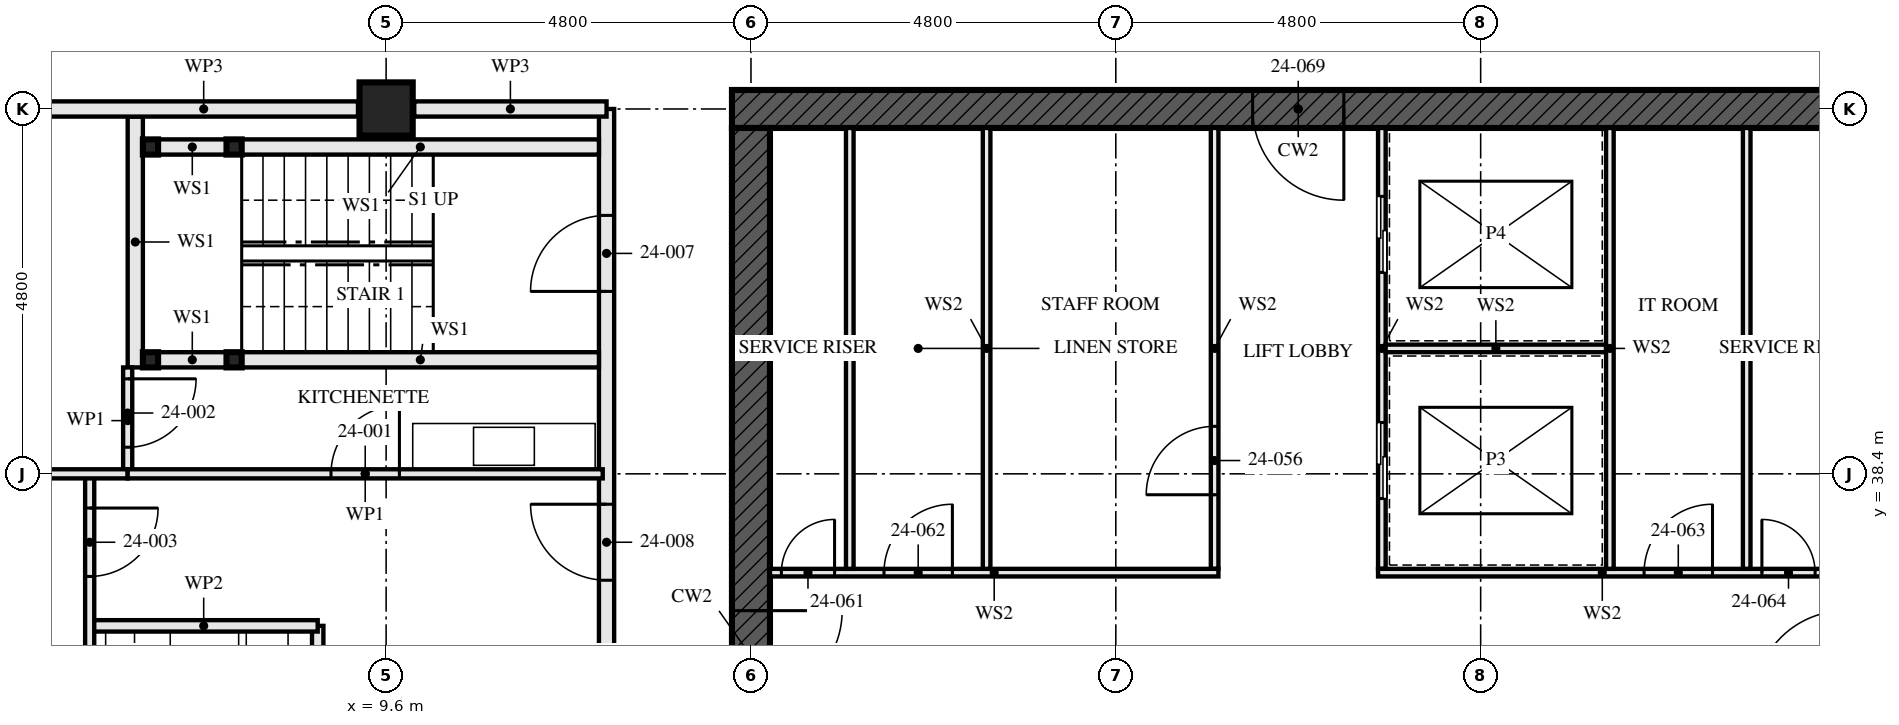
"""IFC4 building model, lengths in metres.
Left out: names, types, materials, properties, quantities, classifications, styles, units other than length and angle.
Written with IfcOpenShell. Run it as: python <this file> out.ifc"""

import sys

from ifc_helpers import new_model, si_unit, direction, frame, frame_2d, origin, origin_2d, place, context, subcontext, project, spatial, rectangle, hollow_rectangle, extrude, element, fill, save


model = new_model("IFC4")
c1 = context("Model", 3, precision=1e-05, world=origin(), true_north=direction((0.0, 1.0)))
c2 = subcontext(c1, "Body", "Model", "MODEL_VIEW")
j1 = project(units=[si_unit("LENGTHUNIT", "METRE"), si_unit("PLANEANGLEUNIT", "RADIAN")], contexts=[c1])
p1 = place(None, origin())
s1 = spatial("IfcSite", under=j1, at=p1, CompositionType="ELEMENT")
p2 = place(p1, origin())
s2 = spatial("IfcBuilding", under=s1, at=p2, CompositionType="ELEMENT")
p3 = place(p2, frame((0.0, 0.0, 91.0)))
s3 = spatial("IfcBuildingStorey", under=s2, at=p3, CompositionType="ELEMENT", Elevation=91.0)
p4 = place(p3, frame((9.6, 43.2, 0.0), z_axis=(0.0, 0.0, 1.0), x_axis=(0.0, 1.0, 0.0)))
e1 = element("IfcColumn", 1, at=p4, inside=s3, PredefinedType="COLUMN", context=c2, shape_type="SweptSolid", body=[
    extrude(hollow_rectangle(XDim=0.7, YDim=0.7, WallThickness=0.06, at=origin_2d()), origin(), (0.0, 0.0, 1.0), 3.5),
])
p5 = place(p3, frame((29.05, 43.2, -0.17), z_axis=(0.0, 0.0, 1.0), x_axis=(-1.0, 0.0, 0.0)))
e2 = element("IfcWall", 2, at=p5, inside=s3, PredefinedType="SHEAR", context=c2, shape_type="SweptSolid", body=[
    extrude(rectangle(XDim=14.9, YDim=0.5, at=frame_2d((7.45, 0.0))), origin(), (0.0, 0.0, 1.0), 3.5),
])
p6 = place(p5, frame((6.85, 0.0, 0.17)))
e3 = element("IfcOpeningElement", 3, at=p6, cuts=e2, PredefinedType="OPENING", context=c2, shape_type="SweptSolid", body=[
    extrude(rectangle(XDim=1.2, YDim=2.1, at=frame_2d((0.6, 1.05))), frame((0.0, 0.26, 0.0), z_axis=(0.0, -1.0, 0.0), x_axis=(1.0, 0.0, 0.0)), (0.0, 0.0, 1.0), 0.521),
])
p7 = place(p3, frame((14.4, 42.95, -0.17), z_axis=(0.0, 0.0, 1.0), x_axis=(0.0, -1.0, 0.0)))
e4 = element("IfcWall", 4, at=p7, inside=s3, PredefinedType="SHEAR", context=c2, shape_type="SweptSolid", body=[
    extrude(rectangle(XDim=13.9, YDim=0.5, at=frame_2d((6.95, 0.0))), origin(), (0.0, 0.0, 1.0), 3.5),
])
p8 = place(p7, frame((6.35, 0.0, 0.17)))
e5 = element("IfcOpeningElement", 5, at=p8, cuts=e4, PredefinedType="OPENING", context=c2, shape_type="SweptSolid", body=[
    extrude(rectangle(XDim=1.2, YDim=2.1, at=frame_2d((0.6, 1.05))), frame((0.0, 0.26, 0.0), z_axis=(0.0, -1.0, 0.0), x_axis=(1.0, 0.0, 0.0)), (0.0, 0.0, 1.0), 0.521),
])
for number, where, z_axis, x_axis in (
    (6, (6.5, 42.7, 0.0), (0.0, 0.0, 1.0), (1.0, 0.0, 0.0)),
    (7, (6.5, 39.9, 0.0), (0.0, 0.0, 1.0), (1.0, 0.0, 0.0)),
    (8, (7.6, 42.7, 0.0), (0.0, 0.0, 1.0), (1.0, 0.0, 0.0)),
    (9, (7.6, 39.9, 0.0), (0.0, 0.0, 1.0), (1.0, 0.0, 0.0)),
):
    element("IfcColumn", number, at=place(p3, frame(where, z_axis=z_axis, x_axis=x_axis)), inside=s3, PredefinedType="COLUMN", context=c2, shape_type="SweptSolid", body=[
        extrude(hollow_rectangle(XDim=0.2, YDim=0.2, WallThickness=0.008, at=origin_2d()), origin(), (0.0, 0.0, 1.0), 3.33),
    ])
p9 = place(p3, frame((6.6, 42.7, 0.0), z_axis=(0.0, 0.0, 1.0), x_axis=(1.0, 0.0, 0.0)))
e10 = element("IfcWall", 10, at=p9, inside=s3, PredefinedType="SOLIDWALL", context=c2, shape_type="SweptSolid", body=[
    extrude(rectangle(XDim=0.9, YDim=0.2, at=frame_2d((0.45, 0.0))), origin(), (0.0, 0.0, 1.0), 2.99),
])
p10 = place(p3, frame((7.7, 42.7, 0.0), z_axis=(0.0, 0.0, 1.0), x_axis=(1.0, 0.0, 0.0)))
e11 = element("IfcWall", 11, at=p10, inside=s3, PredefinedType="SOLIDWALL", context=c2, shape_type="SweptSolid", body=[
    extrude(rectangle(XDim=4.7, YDim=0.2, at=frame_2d((2.35, 0.0))), origin(), (0.0, 0.0, 1.0), 2.99),
])
p11 = place(p3, frame((6.6, 39.9, 0.0), z_axis=(0.0, 0.0, 1.0), x_axis=(1.0, 0.0, 0.0)))
e12 = element("IfcWall", 12, at=p11, inside=s3, PredefinedType="SOLIDWALL", context=c2, shape_type="SweptSolid", body=[
    extrude(rectangle(XDim=0.9, YDim=0.2, at=frame_2d((0.45, 0.0))), origin(), (0.0, 0.0, 1.0), 2.99),
])
p12 = place(p3, frame((7.7, 39.9, 0.0), z_axis=(0.0, 0.0, 1.0), x_axis=(1.0, 0.0, 0.0)))
e13 = element("IfcWall", 13, at=p12, inside=s3, PredefinedType="SOLIDWALL", context=c2, shape_type="SweptSolid", body=[
    extrude(rectangle(XDim=4.7, YDim=0.2, at=frame_2d((2.35, 0.0))), origin(), (0.0, 0.0, 1.0), 2.99),
])
p13 = place(p3, frame((6.3, 43.1, 0.0), z_axis=(0.0, 0.0, 1.0), x_axis=(0.0, -1.0, 0.0)))
e14 = element("IfcWall", 14, at=p13, inside=s3, PredefinedType="SOLIDWALL", context=c2, shape_type="SweptSolid", body=[
    extrude(rectangle(XDim=3.3, YDim=0.2, at=frame_2d((1.65, 0.0))), origin(), (0.0, 0.0, 1.0), 3.33),
])
p14 = place(p3, frame((5.7, 36.4, 0.0), z_axis=(0.0, 0.0, 1.0), x_axis=(1.0, 0.0, 0.0)))
e15 = element("IfcWall", 15, at=p14, inside=s3, PredefinedType="PARTITIONING", context=c2, shape_type="SweptSolid", body=[
    extrude(rectangle(XDim=3.0, YDim=0.15, at=frame_2d((1.5, 0.0))), origin(), (0.0, 0.0, 1.0), 3.33),
])
p15 = place(p3, frame((8.7, 36.4, 0.0), z_axis=(0.0, 0.0, 1.0), x_axis=(0.0, -1.0, 0.0)))
e16 = element("IfcWall", 16, at=p15, inside=s3, PredefinedType="PARTITIONING", context=c2, shape_type="SweptSolid", body=[
    extrude(rectangle(XDim=2.8, YDim=0.15, at=frame_2d((1.4, 0.0))), origin(), (0.0, 0.0, 1.0), 3.33),
])
p16 = place(p3, frame((6.2, 38.4, 0.0), z_axis=(0.0, 0.0, 1.0), x_axis=(1.0, 0.0, 0.0)))
e17 = element("IfcWall", 17, at=p16, inside=s3, PredefinedType="PARTITIONING", context=c2, shape_type="SweptSolid", body=[
    extrude(rectangle(XDim=6.25, YDim=0.12, at=frame_2d((3.125, 0.0))), origin(), (0.0, 0.0, 1.0), 2.55),
])
p17 = place(p16, frame((2.675, 0.0, 0.0)))
e18 = element("IfcOpeningElement", 18, at=p17, cuts=e17, PredefinedType="OPENING", context=c2, shape_type="SweptSolid", body=[
    extrude(rectangle(XDim=0.9, YDim=2.1, at=frame_2d((0.45, 1.05))), frame((0.0, 0.071, 0.0), z_axis=(0.0, -1.0, 0.0), x_axis=(1.0, 0.0, 0.0)), (0.0, 0.0, 1.0), 0.141),
])
p18 = place(p3, frame((6.2, 39.8, 0.0), z_axis=(0.0, 0.0, 1.0), x_axis=(0.0, -1.0, 0.0)))
e19 = element("IfcWall", 19, at=p18, inside=s3, PredefinedType="PARTITIONING", context=c2, shape_type="SweptSolid", body=[
    extrude(rectangle(XDim=1.4, YDim=0.12, at=frame_2d((0.7, 0.0))), origin(), (0.0, 0.0, 1.0), 3.33),
])
p19 = place(p18, frame((0.15, 0.0, 0.0)))
e20 = element("IfcOpeningElement", 20, at=p19, cuts=e19, PredefinedType="OPENING", context=c2, shape_type="SweptSolid", body=[
    extrude(rectangle(XDim=0.9, YDim=2.1, at=frame_2d((0.45, 1.05))), frame((0.0, 0.071, 0.0), z_axis=(0.0, -1.0, 0.0), x_axis=(1.0, 0.0, 0.0)), (0.0, 0.0, 1.0), 0.141),
])
p20 = place(p3, frame((5.7, 38.4, 0.0), z_axis=(0.0, 0.0, 1.0), x_axis=(0.0, -1.0, 0.0)))
e21 = element("IfcWall", 21, at=p20, inside=s3, PredefinedType="PARTITIONING", context=c2, shape_type="SweptSolid", body=[
    extrude(rectangle(XDim=4.8, YDim=0.12, at=frame_2d((2.4, 0.0))), origin(), (0.0, 0.0, 1.0), 3.33),
])
p21 = place(p20, frame((0.45, 0.0, 0.0)))
e22 = element("IfcOpeningElement", 22, at=p21, cuts=e21, PredefinedType="OPENING", context=c2, shape_type="SweptSolid", body=[
    extrude(rectangle(XDim=0.9, YDim=2.1, at=frame_2d((0.45, 1.05))), frame((0.0, 0.071, 0.0), z_axis=(0.0, -1.0, 0.0), x_axis=(1.0, 0.0, 0.0)), (0.0, 0.0, 1.0), 0.141),
])
p22 = place(p20, frame((2.925, 0.0, 0.0)))
e23 = element("IfcOpeningElement", 23, at=p22, cuts=e21, PredefinedType="OPENING", context=c2, shape_type="SweptSolid", body=[
    extrude(rectangle(XDim=0.95, YDim=2.1, at=frame_2d((0.475, 1.05))), frame((0.0, 0.071, 0.0), z_axis=(0.0, -1.0, 0.0), x_axis=(1.0, 0.0, 0.0)), (0.0, 0.0, 1.0), 0.141),
])
p23 = place(p3, frame((0.345, 38.4, 0.0), z_axis=(0.0, 0.0, 1.0), x_axis=(1.0, 0.0, 0.0)))
e24 = element("IfcWall", 24, at=p23, inside=s3, PredefinedType="PARTITIONING", context=c2, shape_type="SweptSolid", body=[
    extrude(rectangle(XDim=5.855, YDim=0.12, at=frame_2d((2.927, 0.0))), origin(), (0.0, 0.0, 1.0), 2.55),
])
p24 = place(p3, frame((12.5, 43.2, 0.0), z_axis=(0.0, 0.0, 1.0), x_axis=(0.0, -1.0, 0.0)))
e25 = element("IfcWall", 25, at=p24, inside=s3, PredefinedType="PARTITIONING", context=c2, shape_type="SweptSolid", body=[
    extrude(rectangle(XDim=14.84, YDim=0.2, at=frame_2d((7.42, 0.0))), origin(), (0.0, 0.0, 1.0), 2.32),
])
p25 = place(p24, frame((1.4, 0.0, 0.0)))
e26 = element("IfcOpeningElement", 26, at=p25, cuts=e25, PredefinedType="OPENING", context=c2, shape_type="SweptSolid", body=[
    extrude(rectangle(XDim=1.0, YDim=2.1, at=frame_2d((0.5, 1.05))), frame((0.0, 0.111, 0.0), z_axis=(0.0, -1.0, 0.0), x_axis=(1.0, 0.0, 0.0)), (0.0, 0.0, 1.0), 0.221),
])
p26 = place(p24, frame((5.2, 0.0, 0.0)))
e27 = element("IfcOpeningElement", 27, at=p26, cuts=e25, PredefinedType="OPENING", context=c2, shape_type="SweptSolid", body=[
    extrude(rectangle(XDim=1.0, YDim=2.1, at=frame_2d((0.5, 1.05))), frame((0.0, 0.111, 0.0), z_axis=(0.0, -1.0, 0.0), x_axis=(1.0, 0.0, 0.0)), (0.0, 0.0, 1.0), 0.221),
])
p27 = place(p24, frame((13.0, 0.0, 0.0)))
e28 = element("IfcOpeningElement", 28, at=p27, cuts=e25, PredefinedType="OPENING", context=c2, shape_type="SweptSolid", body=[
    extrude(rectangle(XDim=1.0, YDim=2.1, at=frame_2d((0.5, 1.05))), frame((0.0, 0.111, 0.0), z_axis=(0.0, -1.0, 0.0), x_axis=(1.0, 0.0, 0.0)), (0.0, 0.0, 1.0), 0.221),
])
for number, where, z_axis, x_axis in (
    (29, (15.7, 37.15, 0.0), (0.0, 0.0, 1.0), (0.0, 1.0, 0.0)),
    (30, (27.5, 37.15, 0.0), (0.0, 0.0, 1.0), (0.0, 1.0, 0.0)),
):
    element("IfcWall", number, at=place(p3, frame(where, z_axis=z_axis, x_axis=x_axis)), inside=s3, PredefinedType="SOLIDWALL", context=c2, shape_type="SweptSolid", body=[
        extrude(rectangle(XDim=5.8, YDim=0.1, at=frame_2d((2.9, 0.0))), origin(), (0.0, 0.0, 1.0), 3.33),
    ])
p28 = place(p3, frame((20.5, 37.15, 0.0), z_axis=(0.0, 0.0, 1.0), x_axis=(0.0, 1.0, 0.0)))
e31 = element("IfcWall", 31, at=p28, inside=s3, PredefinedType="SOLIDWALL", context=c2, shape_type="SweptSolid", body=[
    extrude(rectangle(XDim=5.8, YDim=0.1, at=frame_2d((2.9, 0.0))), origin(), (0.0, 0.0, 1.0), 3.33),
])
p29 = place(p28, frame((0.975, 0.0, 0.0)))
e32 = element("IfcOpeningElement", 32, at=p29, cuts=e31, PredefinedType="OPENING", context=c2, shape_type="SweptSolid", body=[
    extrude(rectangle(XDim=0.9, YDim=2.1, at=frame_2d((0.45, 1.05))), frame((0.0, 0.061, 0.0), z_axis=(0.0, -1.0, 0.0), x_axis=(1.0, 0.0, 0.0)), (0.0, 0.0, 1.0), 0.121),
])
p30 = place(p3, frame((22.7, 37.15, 0.0), z_axis=(0.0, 0.0, 1.0), x_axis=(0.0, 1.0, 0.0)))
e33 = element("IfcWall", 33, at=p30, inside=s3, PredefinedType="SOLIDWALL", context=c2, shape_type="SweptSolid", body=[
    extrude(rectangle(XDim=5.8, YDim=0.1, at=frame_2d((2.9, 0.0))), origin(), (0.0, 0.0, 1.0), 3.33),
])
p31 = place(p30, frame((0.925, 0.0, 0.0)))
e34 = element("IfcOpeningElement", 34, at=p31, cuts=e33, PredefinedType="OPENING", context=c2, shape_type="SweptSolid", body=[
    extrude(rectangle(XDim=1.0, YDim=2.1, at=frame_2d((0.5, 1.05))), frame((0.0, 0.061, 0.0), z_axis=(0.0, -1.0, 0.0), x_axis=(1.0, 0.0, 0.0)), (0.0, 0.0, 1.0), 0.121),
])
p32 = place(p30, frame((3.9, 0.0, 0.0)))
e35 = element("IfcOpeningElement", 35, at=p32, cuts=e33, PredefinedType="OPENING", context=c2, shape_type="SweptSolid", body=[
    extrude(rectangle(XDim=1.0, YDim=2.1, at=frame_2d((0.5, 1.05))), frame((0.0, 0.061, 0.0), z_axis=(0.0, -1.0, 0.0), x_axis=(1.0, 0.0, 0.0)), (0.0, 0.0, 1.0), 0.121),
])
p33 = place(p3, frame((14.65, 37.1, 0.0), z_axis=(0.0, 0.0, 1.0), x_axis=(1.0, 0.0, 0.0)))
e36 = element("IfcWall", 36, at=p33, inside=s3, PredefinedType="SOLIDWALL", context=c2, shape_type="SweptSolid", body=[
    extrude(rectangle(XDim=5.9, YDim=0.1, at=frame_2d((2.95, 0.0))), origin(), (0.0, 0.0, 1.0), 3.33),
])
p34 = place(p33, frame((0.15, 0.0, 0.0)))
e37 = element("IfcOpeningElement", 37, at=p34, cuts=e36, PredefinedType="OPENING", context=c2, shape_type="SweptSolid", body=[
    extrude(rectangle(XDim=0.7, YDim=2.1, at=frame_2d((0.35, 1.05))), frame((0.0, 0.061, 0.0), z_axis=(0.0, -1.0, 0.0), x_axis=(1.0, 0.0, 0.0)), (0.0, 0.0, 1.0), 0.121),
])
p35 = place(p33, frame((1.5, 0.0, 0.0)))
e38 = element("IfcOpeningElement", 38, at=p35, cuts=e36, PredefinedType="OPENING", context=c2, shape_type="SweptSolid", body=[
    extrude(rectangle(XDim=0.9, YDim=2.1, at=frame_2d((0.45, 1.05))), frame((0.0, 0.061, 0.0), z_axis=(0.0, -1.0, 0.0), x_axis=(1.0, 0.0, 0.0)), (0.0, 0.0, 1.0), 0.121),
])
p36 = place(p3, frame((22.65, 37.1, 0.0), z_axis=(0.0, 0.0, 1.0), x_axis=(1.0, 0.0, 0.0)))
e39 = element("IfcWall", 39, at=p36, inside=s3, PredefinedType="SOLIDWALL", context=c2, shape_type="SweptSolid", body=[
    extrude(rectangle(XDim=5.9, YDim=0.1, at=frame_2d((2.95, 0.0))), origin(), (0.0, 0.0, 1.0), 3.33),
])
p37 = place(p36, frame((3.5, 0.0, 0.0)))
e40 = element("IfcOpeningElement", 40, at=p37, cuts=e39, PredefinedType="OPENING", context=c2, shape_type="SweptSolid", body=[
    extrude(rectangle(XDim=0.9, YDim=2.1, at=frame_2d((0.45, 1.05))), frame((0.0, 0.061, 0.0), z_axis=(0.0, -1.0, 0.0), x_axis=(1.0, 0.0, 0.0)), (0.0, 0.0, 1.0), 0.121),
])
p38 = place(p36, frame((5.05, 0.0, 0.0)))
e41 = element("IfcOpeningElement", 41, at=p38, cuts=e39, PredefinedType="OPENING", context=c2, shape_type="SweptSolid", body=[
    extrude(rectangle(XDim=0.7, YDim=2.1, at=frame_2d((0.35, 1.05))), frame((0.0, 0.061, 0.0), z_axis=(0.0, -1.0, 0.0), x_axis=(1.0, 0.0, 0.0)), (0.0, 0.0, 1.0), 0.121),
])
p39 = place(p3, frame((17.5, 37.15, 0.0), z_axis=(0.0, 0.0, 1.0), x_axis=(0.0, 1.0, 0.0)))
e42 = element("IfcWall", 42, at=p39, inside=s3, PredefinedType="SOLIDWALL", context=c2, shape_type="SweptSolid", body=[
    extrude(rectangle(XDim=5.8, YDim=0.1, at=frame_2d((2.9, 0.0))), origin(), (0.0, 0.0, 1.0), 3.33),
])
p40 = place(p3, frame((22.75, 40.05, 0.0), z_axis=(0.0, 0.0, 1.0), x_axis=(1.0, 0.0, 0.0)))
e43 = element("IfcWall", 43, at=p40, inside=s3, PredefinedType="SOLIDWALL", context=c2, shape_type="SweptSolid", body=[
    extrude(rectangle(XDim=2.9, YDim=0.1, at=frame_2d((1.45, 0.0))), origin(), (0.0, 0.0, 1.0), 3.33),
])
p41 = place(p3, frame((25.7, 37.15, 0.0), z_axis=(0.0, 0.0, 1.0), x_axis=(0.0, 1.0, 0.0)))
e44 = element("IfcWall", 44, at=p41, inside=s3, PredefinedType="SOLIDWALL", context=c2, shape_type="SweptSolid", body=[
    extrude(rectangle(XDim=5.8, YDim=0.1, at=frame_2d((2.9, 0.0))), origin(), (0.0, 0.0, 1.0), 3.33),
])
p42 = place(p3, frame((12.5, 43.2, 0.0), z_axis=(0.0, 0.0, 1.0), x_axis=(-1.0, 0.0, 0.0)))
e45 = element("IfcWall", 45, at=p42, inside=s3, PredefinedType="PARTITIONING", context=c2, shape_type="SweptSolid", body=[
    extrude(rectangle(XDim=2.53, YDim=0.2, at=frame_2d((1.265, 0.0))), origin(), (0.0, 0.0, 1.0), 2.32),
])
p43 = place(p3, frame((9.23, 43.2, 0.0), z_axis=(0.0, 0.0, 1.0), x_axis=(-1.0, 0.0, 0.0)))
e46 = element("IfcWall", 46, at=p43, inside=s3, PredefinedType="PARTITIONING", context=c2, shape_type="SweptSolid", body=[
    extrude(rectangle(XDim=4.06, YDim=0.2, at=frame_2d((2.03, 0.0))), origin(), (0.0, 0.0, 1.0), 2.32),
])
p44 = place(p17, origin())
e47 = element("IfcDoor", 47, at=p44, inside=s3, OperationType="SINGLE_SWING_LEFT", PredefinedType="DOOR", context=c2, shape_type="SweptSolid", body=[
    extrude(rectangle(XDim=0.9, YDim=2.1, at=frame_2d((0.45, 1.05))), frame((0.0, 0.022, 0.0), z_axis=(0.0, -1.0, 0.0), x_axis=(1.0, 0.0, 0.0)), (0.0, 0.0, 1.0), 0.044),
])
fill(e18, e47)
p45 = place(p19, origin())
e48 = element("IfcDoor", 48, at=p45, inside=s3, OperationType="SINGLE_SWING_RIGHT", PredefinedType="DOOR", context=c2, shape_type="SweptSolid", body=[
    extrude(rectangle(XDim=0.9, YDim=2.1, at=frame_2d((0.45, 1.05))), frame((0.0, 0.022, 0.0), z_axis=(0.0, -1.0, 0.0), x_axis=(1.0, 0.0, 0.0)), (0.0, 0.0, 1.0), 0.044),
])
fill(e20, e48)
p46 = place(p21, origin())
e49 = element("IfcDoor", 49, at=p46, inside=s3, OperationType="SINGLE_SWING_RIGHT", PredefinedType="DOOR", context=c2, shape_type="SweptSolid", body=[
    extrude(rectangle(XDim=0.9, YDim=2.1, at=frame_2d((0.45, 1.05))), frame((0.0, 0.022, 0.0), z_axis=(0.0, -1.0, 0.0), x_axis=(1.0, 0.0, 0.0)), (0.0, 0.0, 1.0), 0.044),
])
fill(e22, e49)
p47 = place(p25, frame((1.0, 0.0, 0.0), z_axis=(0.0, 0.0, 1.0), x_axis=(-1.0, 0.0, 0.0)))
e50 = element("IfcDoor", 50, at=p47, inside=s3, OperationType="SINGLE_SWING_RIGHT", PredefinedType="DOOR", context=c2, shape_type="SweptSolid", body=[
    extrude(rectangle(XDim=1.0, YDim=2.1, at=frame_2d((0.5, 1.05))), frame((0.0, 0.032, 0.0), z_axis=(0.0, -1.0, 0.0), x_axis=(1.0, 0.0, 0.0)), (0.0, 0.0, 1.0), 0.064),
])
fill(e26, e50)
p48 = place(p26, frame((1.0, 0.0, 0.0), z_axis=(0.0, 0.0, 1.0), x_axis=(-1.0, 0.0, 0.0)))
e51 = element("IfcDoor", 51, at=p48, inside=s3, OperationType="SINGLE_SWING_LEFT", PredefinedType="DOOR", context=c2, shape_type="SweptSolid", body=[
    extrude(rectangle(XDim=1.0, YDim=2.1, at=frame_2d((0.5, 1.05))), frame((0.0, 0.027, 0.0), z_axis=(0.0, -1.0, 0.0), x_axis=(1.0, 0.0, 0.0)), (0.0, 0.0, 1.0), 0.054),
])
fill(e27, e51)
p49 = place(p29, origin())
e52 = element("IfcDoor", 52, at=p49, inside=s3, OperationType="SINGLE_SWING_RIGHT", PredefinedType="DOOR", context=c2, shape_type="SweptSolid", body=[
    extrude(rectangle(XDim=0.9, YDim=2.1, at=frame_2d((0.45, 1.05))), frame((0.0, 0.027, 0.0), z_axis=(0.0, -1.0, 0.0), x_axis=(1.0, 0.0, 0.0)), (0.0, 0.0, 1.0), 0.054),
])
fill(e32, e52)
p50 = place(p31, origin())
e53 = element("IfcDoor", 53, at=p50, inside=s3, OperationType="SLIDING_TO_LEFT", PredefinedType="DOOR", context=c2, shape_type="SweptSolid", body=[
    extrude(rectangle(XDim=1.0, YDim=2.1, at=frame_2d((0.5, 1.05))), frame((0.0, 0.05, 0.0), z_axis=(0.0, -1.0, 0.0), x_axis=(1.0, 0.0, 0.0)), (0.0, 0.0, 1.0), 0.1),
])
fill(e34, e53)
p51 = place(p32, origin())
e54 = element("IfcDoor", 54, at=p51, inside=s3, OperationType="SLIDING_TO_LEFT", PredefinedType="DOOR", context=c2, shape_type="SweptSolid", body=[
    extrude(rectangle(XDim=1.0, YDim=2.1, at=frame_2d((0.5, 1.05))), frame((0.0, 0.05, 0.0), z_axis=(0.0, -1.0, 0.0), x_axis=(1.0, 0.0, 0.0)), (0.0, 0.0, 1.0), 0.1),
])
fill(e35, e54)
p52 = place(p34, origin())
e55 = element("IfcDoor", 55, at=p52, inside=s3, OperationType="SINGLE_SWING_LEFT", PredefinedType="DOOR", context=c2, shape_type="SweptSolid", body=[
    extrude(rectangle(XDim=0.7, YDim=2.1, at=frame_2d((0.35, 1.05))), frame((0.0, 0.027, 0.0), z_axis=(0.0, -1.0, 0.0), x_axis=(1.0, 0.0, 0.0)), (0.0, 0.0, 1.0), 0.054),
])
fill(e37, e55)
p53 = place(p35, origin())
e56 = element("IfcDoor", 56, at=p53, inside=s3, OperationType="SINGLE_SWING_LEFT", PredefinedType="DOOR", context=c2, shape_type="SweptSolid", body=[
    extrude(rectangle(XDim=0.9, YDim=2.1, at=frame_2d((0.45, 1.05))), frame((0.0, 0.027, 0.0), z_axis=(0.0, -1.0, 0.0), x_axis=(1.0, 0.0, 0.0)), (0.0, 0.0, 1.0), 0.054),
])
fill(e38, e56)
p54 = place(p37, origin())
e57 = element("IfcDoor", 57, at=p54, inside=s3, OperationType="SINGLE_SWING_LEFT", PredefinedType="DOOR", context=c2, shape_type="SweptSolid", body=[
    extrude(rectangle(XDim=0.9, YDim=2.1, at=frame_2d((0.45, 1.05))), frame((0.0, 0.027, 0.0), z_axis=(0.0, -1.0, 0.0), x_axis=(1.0, 0.0, 0.0)), (0.0, 0.0, 1.0), 0.054),
])
fill(e40, e57)
p55 = place(p38, origin())
e58 = element("IfcDoor", 58, at=p55, inside=s3, OperationType="SINGLE_SWING_RIGHT", PredefinedType="DOOR", context=c2, shape_type="SweptSolid", body=[
    extrude(rectangle(XDim=0.7, YDim=2.1, at=frame_2d((0.35, 1.05))), frame((0.0, 0.027, 0.0), z_axis=(0.0, -1.0, 0.0), x_axis=(1.0, 0.0, 0.0)), (0.0, 0.0, 1.0), 0.054),
])
fill(e41, e58)
p56 = place(p8, origin())
e59 = element("IfcDoor", 59, at=p56, inside=s3, OperationType="SINGLE_SWING_LEFT", PredefinedType="DOOR", context=c2, shape_type="SweptSolid", body=[
    extrude(rectangle(XDim=1.2, YDim=2.1, at=frame_2d((0.6, 1.05))), frame((0.0, 0.027, 0.0), z_axis=(0.0, -1.0, 0.0), x_axis=(1.0, 0.0, 0.0)), (0.0, 0.0, 1.0), 0.054),
])
fill(e5, e59)
p57 = place(p6, origin())
e60 = element("IfcDoor", 60, at=p57, inside=s3, OperationType="SINGLE_SWING_LEFT", PredefinedType="DOOR", context=c2, shape_type="SweptSolid", body=[
    extrude(rectangle(XDim=1.2, YDim=2.1, at=frame_2d((0.6, 1.05))), frame((0.0, 0.027, 0.0), z_axis=(0.0, -1.0, 0.0), x_axis=(1.0, 0.0, 0.0)), (0.0, 0.0, 1.0), 0.054),
])
fill(e3, e60)
save(model, sys.argv[1])
